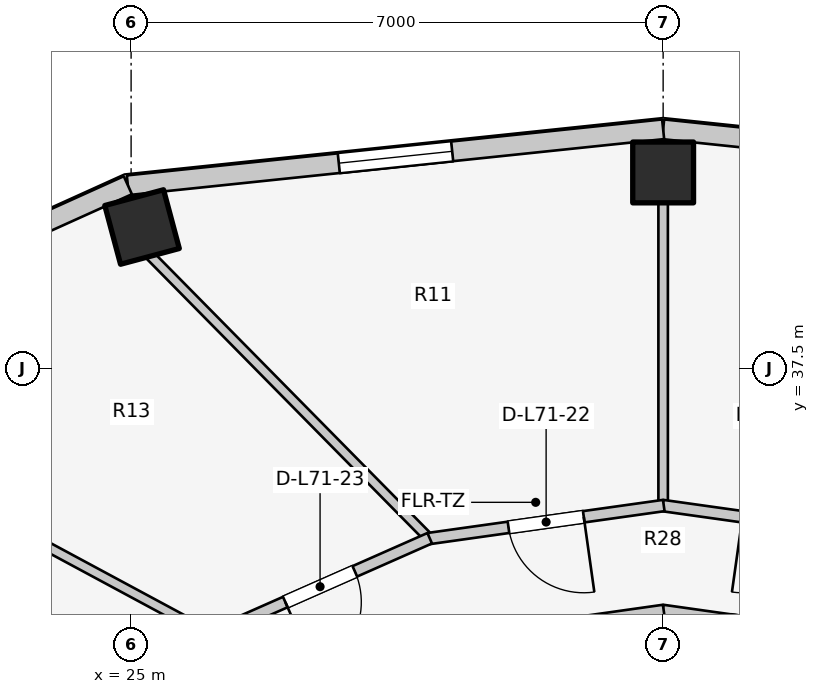
"""IFC4 building model, lengths in metres.
Left out: names, types, materials, properties, quantities, classifications, styles, units other than length and angle.
Written with IfcOpenShell. Run it as: python <this file> out.ifc"""

import sys

from ifc_helpers import new_model, si_unit, direction, frame, frame_2d, origin, origin_2d, place, context, subcontext, project, spatial, rectangle, extrude, element, fill, save


model = new_model("IFC4")
c1 = context("Model", 3, precision=1e-05, world=origin(), true_north=direction((0.0, 1.0)))
c2 = subcontext(c1, "Body", "Model", "MODEL_VIEW")
j1 = project(units=[si_unit("LENGTHUNIT", "METRE"), si_unit("PLANEANGLEUNIT", "RADIAN")], contexts=[c1])
p1 = place(None, origin())
s1 = spatial("IfcSite", under=j1, at=p1, CompositionType="ELEMENT")
p2 = place(p1, origin())
s2 = spatial("IfcBuilding", under=s1, at=p2, CompositionType="ELEMENT")
p3 = place(p2, frame((0.0, 0.0, 232.6)))
s3 = spatial("IfcBuildingStorey", under=s2, at=p3, CompositionType="ELEMENT", Elevation=232.6)
for number, where, z_axis, x_axis in (
    (1, (32.0, 40.08, 0.0), (0.0, 0.0, 1.0), (0.0, 1.0, 0.0)),
    (2, (25.144, 39.362, 0.0), (0.0, 0.0, 1.0), (-0.259, 0.966, 0.0)),
):
    element("IfcColumn", number, at=place(p3, frame(where, z_axis=z_axis, x_axis=x_axis)), inside=s3, PredefinedType="COLUMN", context=c2, shape_type="SweptSolid", body=[
        extrude(rectangle(XDim=0.8, YDim=0.8, at=origin_2d()), origin(), (0.0, 0.0, 1.0), 3.1),
    ])
p4 = place(p3, frame((39.043, 39.912, 0.0), z_axis=(0.0, 0.0, 1.0), x_axis=(-0.994582822721, 0.103947144014, 0.0)))
e3 = element("IfcWall", 3, at=p4, inside=s3, PredefinedType="STANDARD", context=c2, shape_type="SweptSolid", body=[
    extrude(rectangle(XDim=7.081, YDim=0.26, at=frame_2d((3.541, 0.0))), origin(), (0.0, 0.0, 1.0), 2.85),
])
p5 = place(p4, frame((2.791, 0.0, 0.75)))
e4 = element("IfcOpeningElement", 4, at=p5, cuts=e3, PredefinedType="OPENING", context=c2, shape_type="SweptSolid", body=[
    extrude(rectangle(XDim=1.5, YDim=1.6, at=frame_2d((0.75, 0.8))), frame((0.0, 0.14, 0.0), z_axis=(0.0, -1.0, 0.0), x_axis=(1.0, 0.0, 0.0)), (0.0, 0.0, 1.0), 0.28),
])
p6 = place(p3, frame((32.0, 40.648, 0.0), z_axis=(0.0, 0.0, 1.0), x_axis=(-0.994582822721, -0.103947144014, 0.0)))
e5 = element("IfcWall", 5, at=p6, inside=s3, PredefinedType="STANDARD", context=c2, shape_type="SweptSolid", body=[
    extrude(rectangle(XDim=7.081, YDim=0.26, at=frame_2d((3.541, 0.0))), origin(), (0.0, 0.0, 1.0), 2.85),
])
p7 = place(p6, frame((2.791, 0.0, 0.75)))
e6 = element("IfcOpeningElement", 6, at=p7, cuts=e5, PredefinedType="OPENING", context=c2, shape_type="SweptSolid", body=[
    extrude(rectangle(XDim=1.5, YDim=1.6, at=frame_2d((0.75, 0.8))), frame((0.0, 0.14, 0.0), z_axis=(0.0, -1.0, 0.0), x_axis=(1.0, 0.0, 0.0)), (0.0, 0.0, 1.0), 0.28),
])
p8 = place(p3, frame((24.957, 39.912, 0.0), z_axis=(0.0, 0.0, 1.0), x_axis=(-0.911427484938, -0.411460738952, 0.0)))
e7 = element("IfcWall", 7, at=p8, inside=s3, PredefinedType="STANDARD", context=c2, shape_type="SweptSolid", body=[
    extrude(rectangle(XDim=5.296, YDim=0.26, at=frame_2d((2.648, 0.0))), origin(), (0.0, 0.0, 1.0), 2.85),
])
p9 = place(p8, frame((1.448, 0.0, 0.75)))
e8 = element("IfcOpeningElement", 8, at=p9, cuts=e7, PredefinedType="OPENING", context=c2, shape_type="SweptSolid", body=[
    extrude(rectangle(XDim=2.4, YDim=1.7, at=frame_2d((1.2, 0.85))), frame((0.0, 0.14, 0.0), z_axis=(0.0, -1.0, 0.0), x_axis=(1.0, 0.0, 0.0)), (0.0, 0.0, 1.0), 0.28),
])
p10 = place(p3, frame((32.0, 31.1, 0.0), z_axis=(0.0, 0.0, 1.0), x_axis=(0.0, 1.0, 0.0)))
e9 = element("IfcWall", 9, at=p10, inside=s3, PredefinedType="PARTITIONING", context=c2, shape_type="SweptSolid", body=[
    extrude(rectangle(XDim=3.218, YDim=0.125, at=frame_2d((1.609, 0.0))), origin(), (0.0, 0.0, 1.0), 2.376),
])
p11 = place(p3, frame((34.724, 33.932, 0.0), z_axis=(0.0, 0.0, 1.0), x_axis=(-0.990150268487, 0.140008734782, 0.0)))
e10 = element("IfcWall", 10, at=p11, inside=s3, PredefinedType="PARTITIONING", context=c2, shape_type="SweptSolid", body=[
    extrude(rectangle(XDim=2.759, YDim=0.15, at=frame_2d((1.379, 0.0))), origin(), (0.0, 0.0, 1.0), 2.376),
])
p12 = place(p11, frame((0.904, 0.0, 0.0)))
e11 = element("IfcOpeningElement", 11, at=p12, cuts=e10, PredefinedType="OPENING", context=c2, shape_type="SweptSolid", body=[
    extrude(rectangle(XDim=0.95, YDim=2.1, at=frame_2d((0.475, 1.05))), frame((0.0, 0.085, 0.0), z_axis=(0.0, -1.0, 0.0), x_axis=(1.0, 0.0, 0.0)), (0.0, 0.0, 1.0), 0.17),
])
p13 = place(p3, frame((32.007, 34.318, 0.0), z_axis=(0.0, 0.0, 1.0), x_axis=(-0.990150268487, -0.140008734782, 0.0)))
e12 = element("IfcWall", 12, at=p13, inside=s3, PredefinedType="PARTITIONING", context=c2, shape_type="SweptSolid", body=[
    extrude(rectangle(XDim=2.759, YDim=0.15, at=frame_2d((1.379, 0.0))), origin(), (0.0, 0.0, 1.0), 2.376),
])
p14 = place(p3, frame((32.0, 35.753, 0.0), z_axis=(0.0, 0.0, 1.0), x_axis=(0.0, 1.0, 0.0)))
e13 = element("IfcWall", 13, at=p14, inside=s3, PredefinedType="PARTITIONING", context=c2, shape_type="SweptSolid", body=[
    extrude(rectangle(XDim=3.947, YDim=0.125, at=frame_2d((1.974, 0.0))), origin(), (0.0, 0.0, 1.0), 2.376),
])
p15 = place(p3, frame((28.882, 35.304, 0.0), z_axis=(0.0, 0.0, 1.0), x_axis=(-0.702191571271, 0.711988059756, 0.0)))
e14 = element("IfcWall", 14, at=p15, inside=s3, PredefinedType="PARTITIONING", context=c2, shape_type="SweptSolid", body=[
    extrude(rectangle(XDim=5.184, YDim=0.125, at=frame_2d((2.592, 0.0))), origin(), (0.0, 0.0, 1.0), 2.376),
])
p16 = place(p3, frame((26.003, 34.023, 0.0), z_axis=(0.0, 0.0, 1.0), x_axis=(-0.880531534665, 0.473987569943, 0.0)))
e15 = element("IfcWall", 15, at=p16, inside=s3, PredefinedType="PARTITIONING", context=c2, shape_type="SweptSolid", body=[
    extrude(rectangle(XDim=6.096, YDim=0.125, at=frame_2d((3.048, 0.0))), origin(), (0.0, 0.0, 1.0), 2.376),
])
p17 = place(p3, frame((35.087, 35.263, 0.0), z_axis=(0.0, 0.0, 1.0), x_axis=(-0.990268690673, 0.139168675614, 0.0)))
e16 = element("IfcWall", 16, at=p17, inside=s3, PredefinedType="PARTITIONING", context=c2, shape_type="SweptSolid", body=[
    extrude(rectangle(XDim=3.126, YDim=0.15, at=frame_2d((1.563, 0.0))), origin(), (0.0, 0.0, 1.0), 2.376),
])
p18 = place(p17, frame((1.063, 0.0, 0.0)))
e17 = element("IfcOpeningElement", 17, at=p18, cuts=e16, PredefinedType="OPENING", context=c2, shape_type="SweptSolid", body=[
    extrude(rectangle(XDim=1.0, YDim=2.1, at=frame_2d((0.5, 1.05))), frame((0.0, 0.085, 0.0), z_axis=(0.0, -1.0, 0.0), x_axis=(1.0, 0.0, 0.0)), (0.0, 0.0, 1.0), 0.17),
])
p19 = place(p3, frame((32.008, 35.698, 0.0), z_axis=(0.0, 0.0, 1.0), x_axis=(-0.990268690673, -0.139168675614, 0.0)))
e18 = element("IfcWall", 18, at=p19, inside=s3, PredefinedType="PARTITIONING", context=c2, shape_type="SweptSolid", body=[
    extrude(rectangle(XDim=3.126, YDim=0.15, at=frame_2d((1.563, 0.0))), origin(), (0.0, 0.0, 1.0), 2.376),
])
p20 = place(p19, frame((1.063, 0.0, 0.0)))
e19 = element("IfcOpeningElement", 19, at=p20, cuts=e18, PredefinedType="OPENING", context=c2, shape_type="SweptSolid", body=[
    extrude(rectangle(XDim=1.0, YDim=2.1, at=frame_2d((0.5, 1.05))), frame((0.0, 0.085, 0.0), z_axis=(0.0, -1.0, 0.0), x_axis=(1.0, 0.0, 0.0)), (0.0, 0.0, 1.0), 0.17),
])
p21 = place(p3, frame((28.929, 35.268, 0.0), z_axis=(0.0, 0.0, 1.0), x_axis=(-0.914642679993, -0.404263240891, 0.0)))
e20 = element("IfcWall", 20, at=p21, inside=s3, PredefinedType="PARTITIONING", context=c2, shape_type="SweptSolid", body=[
    extrude(rectangle(XDim=3.154, YDim=0.15, at=frame_2d((1.577, 0.0))), origin(), (0.0, 0.0, 1.0), 2.376),
])
p22 = place(p21, frame((1.077, 0.0, 0.0)))
e21 = element("IfcOpeningElement", 21, at=p22, cuts=e20, PredefinedType="OPENING", context=c2, shape_type="SweptSolid", body=[
    extrude(rectangle(XDim=1.0, YDim=2.1, at=frame_2d((0.5, 1.05))), frame((0.0, 0.085, 0.0), z_axis=(0.0, -1.0, 0.0), x_axis=(1.0, 0.0, 0.0)), (0.0, 0.0, 1.0), 0.17),
])
p23 = place(p7, origin())
e22 = element("IfcWindow", 22, at=p23, inside=s3, PartitioningType="SINGLE_PANEL", PredefinedType="WINDOW", context=c2, shape_type="SweptSolid", body=[
    extrude(rectangle(XDim=1.5, YDim=1.6, at=frame_2d((0.75, 0.8))), frame((0.0, 0.03, 0.0), z_axis=(0.0, -1.0, 0.0), x_axis=(1.0, 0.0, 0.0)), (0.0, 0.0, 1.0), 0.06),
])
fill(e6, e22)
p24 = place(p20, origin())
e23 = element("IfcDoor", 23, at=p24, inside=s3, OperationType="SINGLE_SWING_LEFT", PredefinedType="DOOR", context=c2, shape_type="SweptSolid", body=[
    extrude(rectangle(XDim=1.0, YDim=2.1, at=frame_2d((0.5, 1.05))), frame((0.0, 0.025, 0.0), z_axis=(0.0, -1.0, 0.0), x_axis=(1.0, 0.0, 0.0)), (0.0, 0.0, 1.0), 0.05),
])
fill(e19, e23)
p25 = place(p22, origin())
e24 = element("IfcDoor", 24, at=p25, inside=s3, OperationType="SINGLE_SWING_RIGHT", PredefinedType="DOOR", context=c2, shape_type="SweptSolid", body=[
    extrude(rectangle(XDim=1.0, YDim=2.1, at=frame_2d((0.5, 1.05))), frame((0.0, 0.025, 0.0), z_axis=(0.0, -1.0, 0.0), x_axis=(1.0, 0.0, 0.0)), (0.0, 0.0, 1.0), 0.05),
])
fill(e21, e24)
save(model, sys.argv[1])
